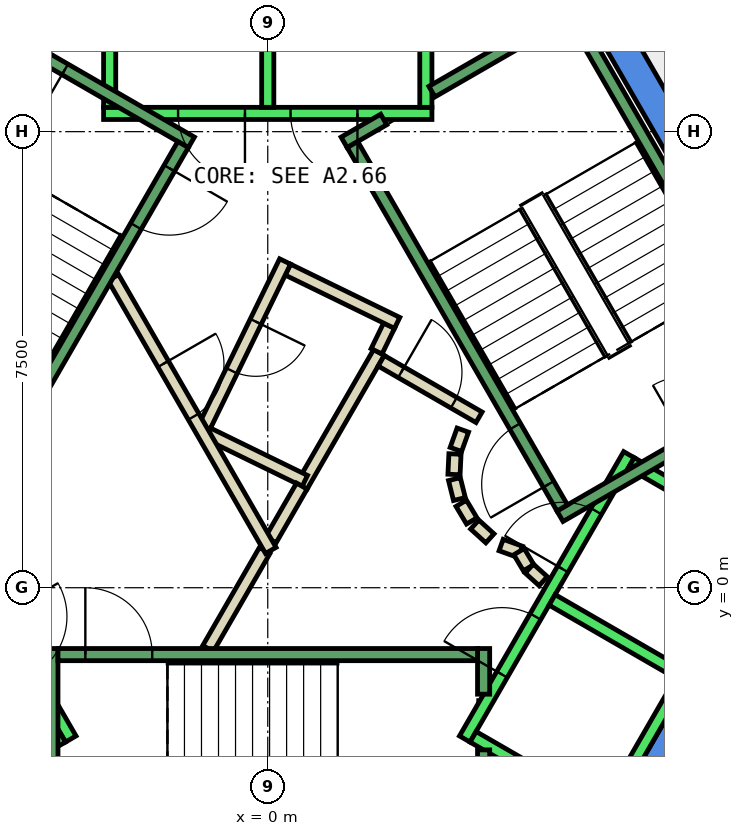
"""IFC4 building model, lengths in metres.
Left out: names, types, materials, properties, quantities, classifications, styles, units other than length and angle.
Written with IfcOpenShell. Run it as: python <this file> out.ifc"""

import sys

from ifc_helpers import new_model, si_unit, direction, frame, frame_2d, origin, place, context, subcontext, project, spatial, polyline, rectangle, outline, extrude, element, fill, save


model = new_model("IFC4")
c1 = context("Model", 3, precision=1e-05, world=origin(), true_north=direction((0.0, 1.0)))
c2 = subcontext(c1, "Body", "Model", "MODEL_VIEW")
j1 = project(units=[si_unit("LENGTHUNIT", "METRE"), si_unit("PLANEANGLEUNIT", "RADIAN")], contexts=[c1])
p1 = place(None, origin())
s1 = spatial("IfcSite", under=j1, at=p1, CompositionType="ELEMENT")
p2 = place(p1, origin())
s2 = spatial("IfcBuilding", under=s1, at=p2, CompositionType="ELEMENT")
p3 = place(p2, frame((0.0, 0.0, 315.2)))
s3 = spatial("IfcBuildingStorey", under=s2, at=p3, CompositionType="ELEMENT", Elevation=315.2)
p4 = place(p3, frame((0.0, 0.0, -0.34)))
e1 = element("IfcWall", 1, at=p4, inside=s3, PredefinedType="SHEAR", context=c2, shape_type="SweptSolid", body=[
    extrude(outline(polyline([(5.486, 9.998), (5.053, 9.748), (9.238, 2.5), (9.815, 2.5), (5.486, 9.998)])), origin(), (0.0, 0.0, 1.0), 3.6),
])
p5 = place(p3, frame((0.0, 0.0, -0.34)))
e2 = element("IfcWall", 2, at=p5, inside=s3, PredefinedType="SHEAR", context=c2, shape_type="SweptSolid", body=[
    extrude(outline(polyline([(4.907, -6.0), (9.815, 2.5), (9.238, 2.5), (4.619, -5.5), (4.907, -6.0)])), origin(), (0.0, 0.0, 1.0), 3.6),
])
p6 = place(p3, frame((0.56, 1.671, 0.0), z_axis=(0.0, 0.0, 1.0), x_axis=(0.500008334558, 0.866020591771, 0.0)))
e3 = element("IfcWall", 3, at=p6, inside=s3, PredefinedType="PARTITIONING", context=c2, shape_type="SweptSolid", body=[
    extrude(rectangle(XDim=2.538, YDim=0.2, at=frame_2d((1.269, 0.0))), origin(), (0.0, 0.0, 1.0), 3.26),
])
p7 = place(p3, frame((1.79, 3.888, 0.0), z_axis=(0.0, 0.0, 1.0), x_axis=(0.437807406823, 0.899068781869, 0.0)))
e4 = element("IfcWall", 4, at=p7, inside=s3, PredefinedType="PARTITIONING", context=c2, shape_type="SweptSolid", body=[
    extrude(rectangle(XDim=0.469, YDim=0.2, at=frame_2d((0.234, 0.0))), origin(), (0.0, 0.0, 1.0), 3.26),
])
p8 = place(p3, frame((2.128, 4.355, 0.0), z_axis=(0.0, 0.0, 1.0), x_axis=(-0.898876404494, 0.438202247191, 0.0)))
e5 = element("IfcWall", 5, at=p8, inside=s3, PredefinedType="PARTITIONING", context=c2, shape_type="SweptSolid", body=[
    extrude(rectangle(XDim=1.999, YDim=0.2, at=frame_2d((1.0, 0.0))), origin(), (0.0, 0.0, 1.0), 3.26),
])
p9 = place(p3, frame((0.285, 5.365, 0.0), z_axis=(0.0, 0.0, 1.0), x_axis=(-0.43840190643, -0.898779043168, 0.0)))
e6 = element("IfcWall", 6, at=p9, inside=s3, PredefinedType="PARTITIONING", context=c2, shape_type="SweptSolid", body=[
    extrude(rectangle(XDim=3.1, YDim=0.2, at=frame_2d((1.55, 0.0))), origin(), (0.0, 0.0, 1.0), 3.26),
])
p10 = place(p9, frame((1.1, 0.0, 0.0)))
e7 = element("IfcOpeningElement", 7, at=p10, cuts=e6, PredefinedType="OPENING", context=c2, shape_type="SweptSolid", body=[
    extrude(rectangle(XDim=0.9, YDim=2.1, at=frame_2d((0.45, 1.05))), frame((0.0, 0.11, 0.0), z_axis=(0.0, -1.0, 0.0), x_axis=(1.0, 0.0, 0.0)), (0.0, 0.0, 1.0), 0.22),
])
p11 = place(p3, frame((-0.984, 2.535, 0.0), z_axis=(0.0, 0.0, 1.0), x_axis=(0.898707583217, -0.438548378025, 0.0)))
e8 = element("IfcWall", 8, at=p11, inside=s3, PredefinedType="PARTITIONING", context=c2, shape_type="SweptSolid", body=[
    extrude(rectangle(XDim=1.774, YDim=0.2, at=frame_2d((0.887, 0.0))), origin(), (0.0, 0.0, 1.0), 3.26),
])
p12 = place(p3, frame((-0.982, -1.0, 0.0), z_axis=(0.0, 0.0, 1.0), x_axis=(0.50024047865, 0.865886518847, 0.0)))
e9 = element("IfcWall", 9, at=p12, inside=s3, PredefinedType="PARTITIONING", context=c2, shape_type="SweptSolid", body=[
    extrude(rectangle(XDim=1.863, YDim=0.2, at=frame_2d((0.931, 0.0))), origin(), (0.0, 0.0, 1.0), 3.26),
])
p13 = place(p3, frame((0.05, 0.787, 0.0), z_axis=(0.0, 0.0, 1.0), x_axis=(0.499819111317, 0.866129814729, 0.0)))
e10 = element("IfcWall", 10, at=p13, inside=s3, PredefinedType="PARTITIONING", context=c2, shape_type="SweptSolid", body=[
    extrude(rectangle(XDim=1.021, YDim=0.2, at=frame_2d((0.51, 0.0))), origin(), (0.0, 0.0, 1.0), 3.26),
])
p14 = place(p3, frame((1.866, 3.732, 0.0), z_axis=(0.0, 0.0, 1.0), x_axis=(0.866043361281, -0.499968895414, 0.0)))
e11 = element("IfcWall", 11, at=p14, inside=s3, PredefinedType="PARTITIONING", context=c2, shape_type="SweptSolid", body=[
    extrude(rectangle(XDim=1.858, YDim=0.2, at=frame_2d((0.929, 0.0))), origin(), (0.0, 0.0, 1.0), 3.26),
])
p15 = place(p14, frame((0.379, 0.0, 0.0)))
e12 = element("IfcOpeningElement", 12, at=p15, cuts=e11, PredefinedType="OPENING", context=c2, shape_type="SweptSolid", body=[
    extrude(rectangle(XDim=1.0, YDim=2.1, at=frame_2d((0.5, 1.05))), frame((0.0, 0.11, 0.0), z_axis=(0.0, -1.0, 0.0), x_axis=(1.0, 0.0, 0.0)), (0.0, 0.0, 1.0), 0.22),
])
p16 = place(p3, frame((3.208, 2.592, 0.0), z_axis=(0.0, 0.0, 1.0), x_axis=(-0.337388820924, -0.941365382578, 0.0)))
e13 = element("IfcWall", 13, at=p16, inside=s3, PredefinedType="PARTITIONING", context=c2, shape_type="SweptSolid", body=[
    extrude(rectangle(XDim=0.338, YDim=0.2, at=frame_2d((0.169, 0.0))), origin(), (0.0, 0.0, 1.0), 3.26),
])
p17 = place(p3, frame((3.079, 2.199, 0.0), z_axis=(0.0, 0.0, 1.0), x_axis=(-0.047771483479, -0.998858290933, 0.0)))
e14 = element("IfcWall", 14, at=p17, inside=s3, PredefinedType="PARTITIONING", context=c2, shape_type="SweptSolid", body=[
    extrude(rectangle(XDim=0.337, YDim=0.2, at=frame_2d((0.169, 0.0))), origin(), (0.0, 0.0, 1.0), 3.26),
])
p18 = place(p3, frame((3.07, 1.786, 0.0), z_axis=(0.0, 0.0, 1.0), x_axis=(0.242705583207, -0.970099994784, 0.0)))
e15 = element("IfcWall", 15, at=p18, inside=s3, PredefinedType="PARTITIONING", context=c2, shape_type="SweptSolid", body=[
    extrude(rectangle(XDim=0.338, YDim=0.2, at=frame_2d((0.169, 0.0))), origin(), (0.0, 0.0, 1.0), 3.26),
])
for number, where, z_axis, x_axis in (
    (16, (3.182, 1.388, 0.0), (0.0, 0.0, 1.0), (0.512, -0.859, 0.0)),
    (17, (3.404, 1.039, 0.0), (0.0, 0.0, 1.0), (0.74, -0.672, 0.0)),
):
    element("IfcWall", number, at=place(p3, frame(where, z_axis=z_axis, x_axis=x_axis)), inside=s3, PredefinedType="PARTITIONING", context=c2, shape_type="SweptSolid", body=[
        extrude(rectangle(XDim=0.338, YDim=0.2, at=frame_2d((0.169, 0.0))), origin(), (0.0, 0.0, 1.0), 3.26),
    ])
p19 = place(p3, frame((3.838, 0.702, 0.0), z_axis=(0.0, 0.0, 1.0), x_axis=(0.941035081519, -0.338308993895, 0.0)))
e18 = element("IfcWall", 18, at=p19, inside=s3, PredefinedType="PARTITIONING", context=c2, shape_type="SweptSolid", body=[
    extrude(rectangle(XDim=0.337, YDim=0.2, at=frame_2d((0.168, 0.0))), origin(), (0.0, 0.0, 1.0), 3.26),
])
p20 = place(p3, frame((4.132, 0.593, 0.0), z_axis=(0.0, 0.0, 1.0), x_axis=(0.513561617048, -0.858052717201, 0.0)))
e19 = element("IfcWall", 19, at=p20, inside=s3, PredefinedType="PARTITIONING", context=c2, shape_type="SweptSolid", body=[
    extrude(rectangle(XDim=0.308, YDim=0.2, at=frame_2d((0.154, 0.0))), origin(), (0.0, 0.0, 1.0), 3.26),
])
p21 = place(p3, frame((4.301, 0.315, 0.0), z_axis=(0.0, 0.0, 1.0), x_axis=(0.741798017506, -0.670623367639, 0.0)))
e20 = element("IfcWall", 20, at=p21, inside=s3, PredefinedType="PARTITIONING", context=c2, shape_type="SweptSolid", body=[
    extrude(rectangle(XDim=0.309, YDim=0.2, at=frame_2d((0.154, 0.0))), origin(), (0.0, 0.0, 1.0), 3.26),
])
p22 = place(p3, frame((-2.54, 5.1, 0.0), z_axis=(0.0, 0.0, 1.0), x_axis=(0.499925051871, -0.866068670783, 0.0)))
e21 = element("IfcWall", 21, at=p22, inside=s3, PredefinedType="PARTITIONING", context=c2, shape_type="SweptSolid", body=[
    extrude(rectangle(XDim=5.181, YDim=0.2, at=frame_2d((2.59, 0.0))), origin(), (0.0, 0.0, 1.0), 3.26),
])
p23 = place(p22, frame((1.64, 0.0, 0.0)))
e22 = element("IfcOpeningElement", 22, at=p23, cuts=e21, PredefinedType="OPENING", context=c2, shape_type="SweptSolid", body=[
    extrude(rectangle(XDim=1.0, YDim=2.1, at=frame_2d((0.5, 1.05))), frame((0.0, 0.11, 0.0), z_axis=(0.0, -1.0, 0.0), x_axis=(1.0, 0.0, 0.0)), (0.0, 0.0, 1.0), 0.22),
])
p24 = place(p3, frame((2.7, 7.8, 0.0), z_axis=(0.0, 0.0, 1.0), x_axis=(-1.0, 0.0, 0.0)))
e23 = element("IfcWall", 23, at=p24, inside=s3, PredefinedType="STANDARD", context=c2, shape_type="SweptSolid", body=[
    extrude(rectangle(XDim=5.4, YDim=0.2, at=frame_2d((2.7, 0.0))), origin(), (0.0, 0.0, 1.0), 3.26),
])
p25 = place(p24, frame((1.225, 0.0, 0.0)))
e24 = element("IfcOpeningElement", 24, at=p25, cuts=e23, PredefinedType="OPENING", context=c2, shape_type="SweptSolid", body=[
    extrude(rectangle(XDim=1.1, YDim=2.1, at=frame_2d((0.55, 1.05))), frame((0.0, 0.11, 0.0), z_axis=(0.0, -1.0, 0.0), x_axis=(1.0, 0.0, 0.0)), (0.0, 0.0, 1.0), 0.22),
])
p26 = place(p24, frame((3.075, 0.0, 0.0)))
e25 = element("IfcOpeningElement", 25, at=p26, cuts=e23, PredefinedType="OPENING", context=c2, shape_type="SweptSolid", body=[
    extrude(rectangle(XDim=1.1, YDim=2.1, at=frame_2d((0.55, 1.05))), frame((0.0, 0.11, 0.0), z_axis=(0.0, -1.0, 0.0), x_axis=(1.0, 0.0, 0.0)), (0.0, 0.0, 1.0), 0.22),
])
for number, where, z_axis, x_axis in (
    (26, (2.6, 7.9, 0.0), (0.0, 0.0, 1.0), (0.0, 1.0, 0.0)),
    (27, (0.0, 7.9, 0.0), (0.0, 0.0, 1.0), (0.0, 1.0, 0.0)),
    (28, (-2.6, 7.9, 0.0), (0.0, 0.0, 1.0), (0.0, 1.0, 0.0)),
):
    element("IfcWall", number, at=place(p3, frame(where, z_axis=z_axis, x_axis=x_axis)), inside=s3, PredefinedType="STANDARD", context=c2, shape_type="SweptSolid", body=[
        extrude(rectangle(XDim=2.4, YDim=0.2, at=frame_2d((1.2, 0.0))), origin(), (0.0, 0.0, 1.0), 3.26),
    ])
p27 = place(p3, frame((-5.94, 2.188, 0.0), z_axis=(0.0, 0.0, 1.0), x_axis=(0.500034260056, -0.866005622828, 0.0)))
e29 = element("IfcWall", 29, at=p27, inside=s3, PredefinedType="STANDARD", context=c2, shape_type="SweptSolid", body=[
    extrude(rectangle(XDim=5.399, YDim=0.2, at=frame_2d((2.7, 0.0))), origin(), (0.0, 0.0, 1.0), 3.26),
])
p28 = place(p27, frame((3.075, 0.0, 0.0)))
e30 = element("IfcOpeningElement", 30, at=p28, cuts=e29, PredefinedType="OPENING", context=c2, shape_type="SweptSolid", body=[
    extrude(rectangle(XDim=1.1, YDim=2.1, at=frame_2d((0.55, 1.05))), frame((0.0, 0.11, 0.0), z_axis=(0.0, -1.0, 0.0), x_axis=(1.0, 0.0, 0.0)), (0.0, 0.0, 1.0), 0.22),
])
p29 = place(p27, frame((1.225, 0.0, 0.0)))
e31 = element("IfcOpeningElement", 31, at=p29, cuts=e29, PredefinedType="OPENING", context=c2, shape_type="SweptSolid", body=[
    extrude(rectangle(XDim=1.1, YDim=2.1, at=frame_2d((0.55, 1.05))), frame((0.0, 0.11, 0.0), z_axis=(0.0, -1.0, 0.0), x_axis=(1.0, 0.0, 0.0)), (0.0, 0.0, 1.0), 0.22),
])
p30 = place(p3, frame((-3.377, -2.452, 0.0), z_axis=(0.0, 0.0, 1.0), x_axis=(-0.865955154139, -0.50012165622, 0.0)))
e32 = element("IfcWall", 32, at=p30, inside=s3, PredefinedType="STANDARD", context=c2, shape_type="SweptSolid", body=[
    extrude(rectangle(XDim=2.4, YDim=0.2, at=frame_2d((1.2, 0.0))), origin(), (0.0, 0.0, 1.0), 3.26),
])
p31 = place(p3, frame((3.24, -2.488, 0.0), z_axis=(0.0, 0.0, 1.0), x_axis=(0.500034260056, 0.866005622828, 0.0)))
e33 = element("IfcWall", 33, at=p31, inside=s3, PredefinedType="STANDARD", context=c2, shape_type="SweptSolid", body=[
    extrude(rectangle(XDim=5.399, YDim=0.2, at=frame_2d((2.7, 0.0))), origin(), (0.0, 0.0, 1.0), 3.26),
])
p32 = place(p31, frame((3.225, 0.0, 0.0)))
e34 = element("IfcOpeningElement", 34, at=p32, cuts=e33, PredefinedType="OPENING", context=c2, shape_type="SweptSolid", body=[
    extrude(rectangle(XDim=1.1, YDim=2.1, at=frame_2d((0.55, 1.05))), frame((0.0, 0.11, 0.0), z_axis=(0.0, -1.0, 0.0), x_axis=(1.0, 0.0, 0.0)), (0.0, 0.0, 1.0), 0.22),
])
p33 = place(p31, frame((1.225, 0.0, 0.0)))
e35 = element("IfcOpeningElement", 35, at=p33, cuts=e33, PredefinedType="OPENING", context=c2, shape_type="SweptSolid", body=[
    extrude(rectangle(XDim=1.1, YDim=2.1, at=frame_2d((0.55, 1.05))), frame((0.0, 0.11, 0.0), z_axis=(0.0, -1.0, 0.0), x_axis=(1.0, 0.0, 0.0)), (0.0, 0.0, 1.0), 0.22),
])
p34 = place(p3, frame((5.492, -3.788, 0.0), z_axis=(0.0, 0.0, 1.0), x_axis=(0.500034260056, 0.866005622828, 0.0)))
e36 = element("IfcWall", 36, at=p34, inside=s3, PredefinedType="STANDARD", context=c2, shape_type="SweptSolid", body=[
    extrude(rectangle(XDim=5.399, YDim=0.2, at=frame_2d((2.7, 0.0))), origin(), (0.0, 0.0, 1.0), 3.26),
])
p35 = place(p3, frame((3.377, -2.452, 0.0), z_axis=(0.0, 0.0, 1.0), x_axis=(0.865955154139, -0.50012165622, 0.0)))
e37 = element("IfcWall", 37, at=p35, inside=s3, PredefinedType="STANDARD", context=c2, shape_type="SweptSolid", body=[
    extrude(rectangle(XDim=2.4, YDim=0.2, at=frame_2d((1.2, 0.0))), origin(), (0.0, 0.0, 1.0), 3.26),
])
for number, where, z_axis, x_axis in (
    (38, (4.677, -0.2, 0.0), (0.0, 0.0, 1.0), (0.866, -0.5, 0.0)),
    (39, (5.977, 2.052, 0.0), (0.0, 0.0, 1.0), (0.866, -0.5, 0.0)),
):
    element("IfcWall", number, at=place(p3, frame(where, z_axis=z_axis, x_axis=x_axis)), inside=s3, PredefinedType="STANDARD", context=c2, shape_type="SweptSolid", body=[
        extrude(rectangle(XDim=2.399, YDim=0.2, at=frame_2d((1.2, 0.0))), origin(), (0.0, 0.0, 1.0), 3.26),
    ])
p36 = place(p3, frame((-3.55, -1.0, 0.0), z_axis=(0.0, 0.0, 1.0), x_axis=(0.0, -1.0, 0.0)))
e40 = element("IfcWall", 40, at=p36, inside=s3, PredefinedType="STANDARD", context=c2, shape_type="SweptSolid", body=[
    extrude(rectangle(XDim=4.4, YDim=0.2, at=frame_2d((2.2, 0.0))), origin(), (0.0, 0.0, 1.0), 3.26),
])
p37 = place(p36, frame((2.4, 0.0, 0.0)))
e41 = element("IfcOpeningElement", 41, at=p37, cuts=e40, PredefinedType="OPENING", context=c2, shape_type="SweptSolid", body=[
    extrude(rectangle(XDim=1.1, YDim=2.2, at=frame_2d((0.55, 1.1))), frame((0.0, 0.11, 0.0), z_axis=(0.0, -1.0, 0.0), x_axis=(1.0, 0.0, 0.0)), (0.0, 0.0, 1.0), 0.22),
])
p38 = place(p3, frame((3.55, -2.667, 0.0), z_axis=(0.0, 0.0, 1.0), x_axis=(0.0, -1.0, 0.0)))
e42 = element("IfcWall", 42, at=p38, inside=s3, PredefinedType="STANDARD", context=c2, shape_type="SweptSolid", body=[
    extrude(rectangle(XDim=2.733, YDim=0.2, at=frame_2d((1.366, 0.0))), origin(), (0.0, 0.0, 1.0), 3.26),
])
p39 = place(p3, frame((3.55, -1.0, 0.0), z_axis=(0.0, 0.0, 1.0), x_axis=(0.0, -1.0, 0.0)))
e43 = element("IfcWall", 43, at=p39, inside=s3, PredefinedType="STANDARD", context=c2, shape_type="SweptSolid", body=[
    extrude(rectangle(XDim=0.751, YDim=0.2, at=frame_2d((0.375, 0.0))), origin(), (0.0, 0.0, 1.0), 3.26),
])
p40 = place(p3, frame((-3.45, -1.1, 0.0), z_axis=(0.0, 0.0, 1.0), x_axis=(1.0, 0.0, 0.0)))
e44 = element("IfcWall", 44, at=p40, inside=s3, PredefinedType="STANDARD", context=c2, shape_type="SweptSolid", body=[
    extrude(rectangle(XDim=6.9, YDim=0.2, at=frame_2d((3.45, 0.0))), origin(), (0.0, 0.0, 1.0), 3.26),
])
p41 = place(p40, frame((0.45, 0.0, 0.0)))
e45 = element("IfcOpeningElement", 45, at=p41, cuts=e44, PredefinedType="OPENING", context=c2, shape_type="SweptSolid", body=[
    extrude(rectangle(XDim=1.1, YDim=2.2, at=frame_2d((0.55, 1.1))), frame((0.0, 0.11, 0.0), z_axis=(0.0, -1.0, 0.0), x_axis=(1.0, 0.0, 0.0)), (0.0, 0.0, 1.0), 0.22),
])
p42 = place(p3, frame((4.806, 1.176, 0.0), z_axis=(0.0, 0.0, 1.0), x_axis=(0.866059941101, 0.499940174841, 0.0)))
e46 = element("IfcWall", 46, at=p42, inside=s3, PredefinedType="STANDARD", context=c2, shape_type="SweptSolid", body=[
    extrude(rectangle(XDim=4.4, YDim=0.2, at=frame_2d((2.2, 0.0))), origin(), (0.0, 0.0, 1.0), 3.26),
])
p43 = place(p42, frame((2.4, 0.0, 0.0)))
e47 = element("IfcOpeningElement", 47, at=p43, cuts=e46, PredefinedType="OPENING", context=c2, shape_type="SweptSolid", body=[
    extrude(rectangle(XDim=1.1, YDim=2.2, at=frame_2d((0.55, 1.1))), frame((0.0, 0.11, 0.0), z_axis=(0.0, -1.0, 0.0), x_axis=(1.0, 0.0, 0.0)), (0.0, 0.0, 1.0), 0.22),
])
p44 = place(p3, frame((2.7, 8.158, 0.0), z_axis=(0.0, 0.0, 1.0), x_axis=(0.86611865017, 0.499838457731, 0.0)))
e48 = element("IfcWall", 48, at=p44, inside=s3, PredefinedType="STANDARD", context=c2, shape_type="SweptSolid", body=[
    extrude(rectangle(XDim=2.733, YDim=0.2, at=frame_2d((1.366, 0.0))), origin(), (0.0, 0.0, 1.0), 3.26),
])
p45 = place(p3, frame((1.256, 7.324, 0.0), z_axis=(0.0, 0.0, 1.0), x_axis=(0.865915093549, 0.500191014278, 0.0)))
e49 = element("IfcWall", 49, at=p45, inside=s3, PredefinedType="STANDARD", context=c2, shape_type="SweptSolid", body=[
    extrude(rectangle(XDim=0.752, YDim=0.2, at=frame_2d((0.376, 0.0))), origin(), (0.0, 0.0, 1.0), 3.26),
])
p46 = place(p3, frame((4.843, 1.312, 0.0), z_axis=(0.0, 0.0, 1.0), x_axis=(-0.499963383562, 0.866046543262, 0.0)))
e50 = element("IfcWall", 50, at=p46, inside=s3, PredefinedType="STANDARD", context=c2, shape_type="SweptSolid", body=[
    extrude(rectangle(XDim=6.9, YDim=0.2, at=frame_2d((3.45, 0.0))), origin(), (0.0, 0.0, 1.0), 3.26),
])
p47 = place(p46, frame((0.45, 0.0, 0.0)))
e51 = element("IfcOpeningElement", 51, at=p47, cuts=e50, PredefinedType="OPENING", context=c2, shape_type="SweptSolid", body=[
    extrude(rectangle(XDim=1.1, YDim=2.2, at=frame_2d((0.55, 1.1))), frame((0.0, 0.11, 0.0), z_axis=(0.0, -1.0, 0.0), x_axis=(1.0, 0.0, 0.0)), (0.0, 0.0, 1.0), 0.22),
])
p48 = place(p3, frame((8.48, 3.412, 0.0), z_axis=(0.0, 0.0, 1.0), x_axis=(-0.499978703459, 0.866037698999, 0.0)))
e52 = element("IfcWall", 52, at=p48, inside=s3, PredefinedType="STANDARD", context=c2, shape_type="SweptSolid", body=[
    extrude(rectangle(XDim=6.9, YDim=0.2, at=frame_2d((3.45, 0.0))), origin(), (0.0, 0.0, 1.0), 3.26),
])
p49 = place(p3, frame((-1.256, 7.324, 0.0), z_axis=(0.0, 0.0, 1.0), x_axis=(-0.866046073146, 0.499964197906, 0.0)))
e53 = element("IfcWall", 53, at=p49, inside=s3, PredefinedType="STANDARD", context=c2, shape_type="SweptSolid", body=[
    extrude(rectangle(XDim=4.4, YDim=0.2, at=frame_2d((2.2, 0.0))), origin(), (0.0, 0.0, 1.0), 3.26),
])
p50 = place(p49, frame((2.4, 0.0, 0.0)))
e54 = element("IfcOpeningElement", 54, at=p50, cuts=e53, PredefinedType="OPENING", context=c2, shape_type="SweptSolid", body=[
    extrude(rectangle(XDim=1.1, YDim=2.2, at=frame_2d((0.55, 1.1))), frame((0.0, 0.11, 0.0), z_axis=(0.0, -1.0, 0.0), x_axis=(1.0, 0.0, 0.0)), (0.0, 0.0, 1.0), 0.22),
])
p51 = place(p3, frame((-1.393, 7.288, 0.0), z_axis=(0.0, 0.0, 1.0), x_axis=(-0.499963383562, -0.866046543262, 0.0)))
e55 = element("IfcWall", 55, at=p51, inside=s3, PredefinedType="STANDARD", context=c2, shape_type="SweptSolid", body=[
    extrude(rectangle(XDim=6.9, YDim=0.2, at=frame_2d((3.45, 0.0))), origin(), (0.0, 0.0, 1.0), 3.26),
])
p52 = place(p51, frame((0.45, 0.0, 0.0)))
e56 = element("IfcOpeningElement", 56, at=p52, cuts=e55, PredefinedType="OPENING", context=c2, shape_type="SweptSolid", body=[
    extrude(rectangle(XDim=1.1, YDim=2.2, at=frame_2d((0.55, 1.1))), frame((0.0, 0.11, 0.0), z_axis=(0.0, -1.0, 0.0), x_axis=(1.0, 0.0, 0.0)), (0.0, 0.0, 1.0), 0.22),
])
p53 = place(p15, origin())
e57 = element("IfcDoor", 57, at=p53, inside=s3, OperationType="SINGLE_SWING_LEFT", PredefinedType="DOOR", context=c2, shape_type="SweptSolid", body=[
    extrude(rectangle(XDim=1.0, YDim=2.1, at=frame_2d((0.5, 1.05))), frame((0.0, 0.025, 0.0), z_axis=(0.0, -1.0, 0.0), x_axis=(1.0, 0.0, 0.0)), (0.0, 0.0, 1.0), 0.05),
])
fill(e12, e57)
p54 = place(p23, origin())
e58 = element("IfcDoor", 58, at=p54, inside=s3, OperationType="SINGLE_SWING_RIGHT", PredefinedType="DOOR", context=c2, shape_type="SweptSolid", body=[
    extrude(rectangle(XDim=1.0, YDim=2.1, at=frame_2d((0.5, 1.05))), frame((0.0, 0.025, 0.0), z_axis=(0.0, -1.0, 0.0), x_axis=(1.0, 0.0, 0.0)), (0.0, 0.0, 1.0), 0.05),
])
fill(e22, e58)
p55 = place(p10, origin())
e59 = element("IfcDoor", 59, at=p55, inside=s3, OperationType="SINGLE_SWING_RIGHT", PredefinedType="DOOR", context=c2, shape_type="SweptSolid", body=[
    extrude(rectangle(XDim=0.9, YDim=2.1, at=frame_2d((0.45, 1.05))), frame((0.0, 0.025, 0.0), z_axis=(0.0, -1.0, 0.0), x_axis=(1.0, 0.0, 0.0)), (0.0, 0.0, 1.0), 0.05),
])
fill(e7, e59)
p56 = place(p25, origin())
e60 = element("IfcDoor", 60, at=p56, inside=s3, OperationType="SLIDING_TO_LEFT", PredefinedType="DOOR", context=c2, shape_type="SweptSolid", body=[
    extrude(rectangle(XDim=1.1, YDim=2.1, at=frame_2d((0.55, 1.05))), frame((0.0, 0.025, 0.0), z_axis=(0.0, -1.0, 0.0), x_axis=(1.0, 0.0, 0.0)), (0.0, 0.0, 1.0), 0.05),
])
fill(e24, e60)
p57 = place(p26, origin())
e61 = element("IfcDoor", 61, at=p57, inside=s3, OperationType="SLIDING_TO_LEFT", PredefinedType="DOOR", context=c2, shape_type="SweptSolid", body=[
    extrude(rectangle(XDim=1.1, YDim=2.1, at=frame_2d((0.55, 1.05))), frame((0.0, 0.025, 0.0), z_axis=(0.0, -1.0, 0.0), x_axis=(1.0, 0.0, 0.0)), (0.0, 0.0, 1.0), 0.05),
])
fill(e25, e61)
p58 = place(p32, origin())
e62 = element("IfcDoor", 62, at=p58, inside=s3, OperationType="SLIDING_TO_LEFT", PredefinedType="DOOR", context=c2, shape_type="SweptSolid", body=[
    extrude(rectangle(XDim=1.1, YDim=2.1, at=frame_2d((0.55, 1.05))), frame((0.0, 0.025, 0.0), z_axis=(0.0, -1.0, 0.0), x_axis=(1.0, 0.0, 0.0)), (0.0, 0.0, 1.0), 0.05),
])
fill(e34, e62)
p59 = place(p33, origin())
e63 = element("IfcDoor", 63, at=p59, inside=s3, OperationType="SLIDING_TO_LEFT", PredefinedType="DOOR", context=c2, shape_type="SweptSolid", body=[
    extrude(rectangle(XDim=1.1, YDim=2.1, at=frame_2d((0.55, 1.05))), frame((0.0, 0.025, 0.0), z_axis=(0.0, -1.0, 0.0), x_axis=(1.0, 0.0, 0.0)), (0.0, 0.0, 1.0), 0.05),
])
fill(e35, e63)
p60 = place(p41, origin())
e64 = element("IfcDoor", 64, at=p60, inside=s3, OperationType="SINGLE_SWING_LEFT", PredefinedType="DOOR", context=c2, shape_type="SweptSolid", body=[
    extrude(rectangle(XDim=1.1, YDim=2.2, at=frame_2d((0.55, 1.1))), frame((0.0, 0.025, 0.0), z_axis=(0.0, -1.0, 0.0), x_axis=(1.0, 0.0, 0.0)), (0.0, 0.0, 1.0), 0.05),
])
fill(e45, e64)
p61 = place(p47, origin())
e65 = element("IfcDoor", 65, at=p61, inside=s3, OperationType="SINGLE_SWING_LEFT", PredefinedType="DOOR", context=c2, shape_type="SweptSolid", body=[
    extrude(rectangle(XDim=1.1, YDim=2.2, at=frame_2d((0.55, 1.1))), frame((0.0, 0.025, 0.0), z_axis=(0.0, -1.0, 0.0), x_axis=(1.0, 0.0, 0.0)), (0.0, 0.0, 1.0), 0.05),
])
fill(e51, e65)
p62 = place(p52, origin())
e66 = element("IfcDoor", 66, at=p62, inside=s3, OperationType="SINGLE_SWING_LEFT", PredefinedType="DOOR", context=c2, shape_type="SweptSolid", body=[
    extrude(rectangle(XDim=1.1, YDim=2.2, at=frame_2d((0.55, 1.1))), frame((0.0, 0.025, 0.0), z_axis=(0.0, -1.0, 0.0), x_axis=(1.0, 0.0, 0.0)), (0.0, 0.0, 1.0), 0.05),
])
fill(e56, e66)
p63 = place(p50, origin())
e67 = element("IfcDoor", 67, at=p63, inside=s3, OperationType="SINGLE_SWING_LEFT", PredefinedType="DOOR", context=c2, shape_type="SweptSolid", body=[
    extrude(rectangle(XDim=1.1, YDim=2.2, at=frame_2d((0.55, 1.1))), frame((0.0, 0.025, 0.0), z_axis=(0.0, -1.0, 0.0), x_axis=(1.0, 0.0, 0.0)), (0.0, 0.0, 1.0), 0.05),
])
fill(e54, e67)
save(model, sys.argv[1])
